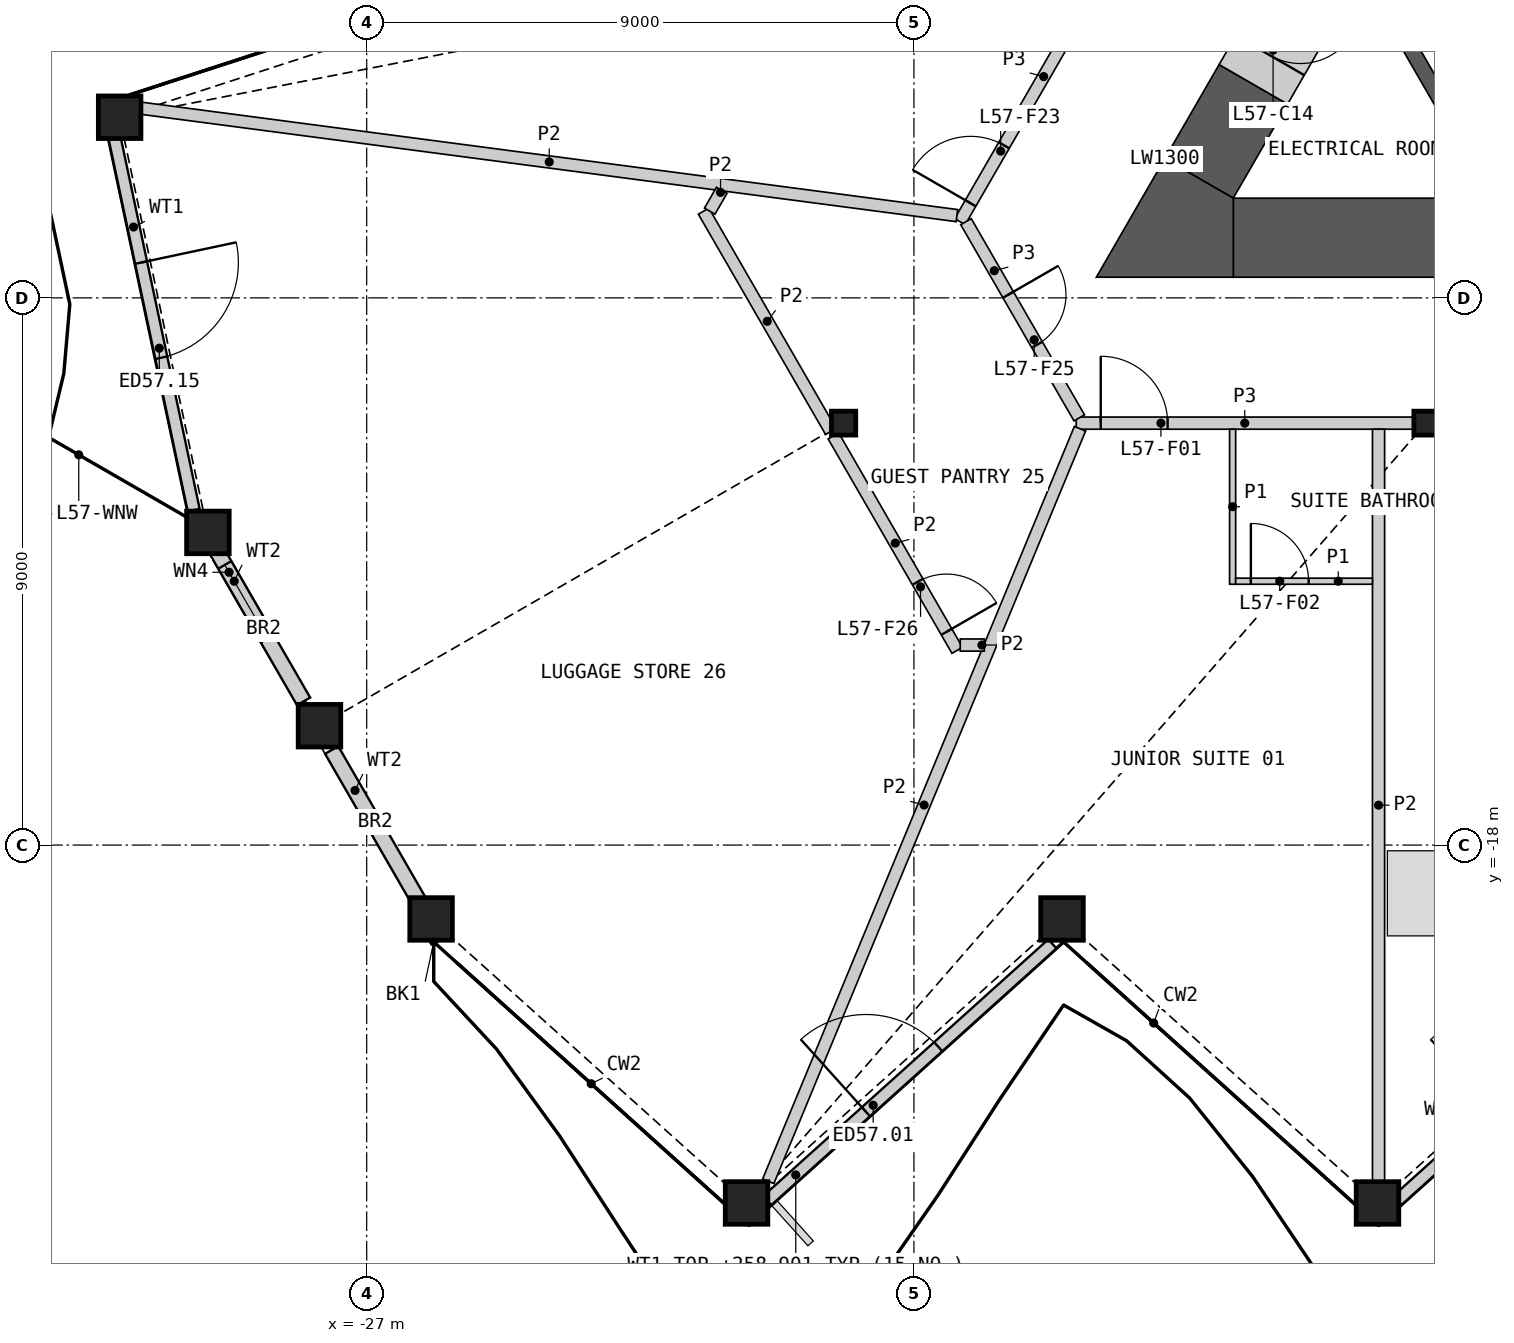
"""IFC4 building model, lengths in metres.
Left out: names, types, materials, properties, quantities, classifications, styles, units other than length and angle.
Written with IfcOpenShell. Run it as: python <this file> out.ifc"""

import sys

from ifc_helpers import new_model, si_unit, direction, frame, frame_2d, origin, origin_2d, place, context, subcontext, project, spatial, polyline, rectangle, hollow_rectangle, i_section, outline, extrude, element, fill, save


model = new_model("IFC4")
c1 = context("Model", 3, precision=1e-05, world=origin(), true_north=direction((0.0, 1.0)))
c2 = subcontext(c1, "Body", "Model", "MODEL_VIEW")
j1 = project(units=[si_unit("LENGTHUNIT", "METRE"), si_unit("PLANEANGLEUNIT", "RADIAN")], contexts=[c1])
p1 = place(None, origin())
s1 = spatial("IfcSite", under=j1, at=p1, CompositionType="ELEMENT")
p2 = place(p1, origin())
s2 = spatial("IfcBuilding", under=s1, at=p2, CompositionType="ELEMENT")
p3 = place(p2, frame((0.0, 0.0, 256.2)))
s3 = spatial("IfcBuildingStorey", under=s2, at=p3, CompositionType="ELEMENT", Elevation=256.2)
for number, where, z_axis, x_axis in (
    (1, (-25.941, -19.215, 0.0), (0.0, 0.0, 1.0), (1.0, 0.0, 0.0)),
    (2, (-20.753, -23.887, 0.0), (0.0, 0.0, 1.0), (1.0, 0.0, 0.0)),
    (3, (-15.565, -19.215, 0.0), (0.0, 0.0, 1.0), (1.0, 0.0, 0.0)),
    (4, (-10.376, -23.887, 0.0), (0.0, 0.0, 1.0), (1.0, 0.0, 0.0)),
    (5, (-31.063, -6.029, 0.0), (0.0, 0.0, 1.0), (1.0, 0.0, 0.0)),
    (6, (-29.612, -12.858, 0.0), (0.0, 0.0, 1.0), (1.0, 0.0, 0.0)),
    (7, (-27.776, -16.037, 0.0), (0.0, 0.0, 1.0), (1.0, 0.0, 0.0)),
):
    element("IfcColumn", number, at=place(p3, frame(where, z_axis=z_axis, x_axis=x_axis)), inside=s3, PredefinedType="COLUMN", context=c2, shape_type="SweptSolid", body=[
        extrude(hollow_rectangle(XDim=0.7, YDim=0.7, WallThickness=0.045, at=origin_2d()), origin(), (0.0, 0.0, 1.0), 3.6),
    ])
for number, where, z_axis, x_axis in (
    (8, (-19.157, -11.06, 0.0), (0.0, 0.0, 1.0), (1.0, 0.0, 0.0)),
    (9, (-9.578, -11.06, 0.0), (0.0, 0.0, 1.0), (1.0, 0.0, 0.0)),
):
    element("IfcColumn", number, at=place(p3, frame(where, z_axis=z_axis, x_axis=x_axis)), inside=s3, PredefinedType="COLUMN", context=c2, shape_type="SweptSolid", body=[
        extrude(i_section(OverallWidth=0.399, OverallDepth=0.393, WebThickness=0.023, FlangeThickness=0.037, at=origin_2d()), origin(), (0.0, 0.0, 1.0), 3.6),
    ])
p4 = place(p3, frame((-20.413, -23.848, 0.0), z_axis=(0.0, 0.0, 1.0), x_axis=(0.74314024121, 0.669135697668, 0.0)))
e10 = element("IfcWall", 10, at=p4, inside=s3, PredefinedType="SOLIDWALL", context=c2, shape_type="SweptSolid", body=[
    extrude(rectangle(XDim=6.311, YDim=0.2, at=frame_2d((3.156, 0.0))), origin(), (0.0, 0.0, 1.0), 2.701),
])
p5 = place(p4, frame((2.184, 0.0, 0.0)))
e11 = element("IfcOpeningElement", 11, at=p5, cuts=e10, PredefinedType="OPENING", context=c2, shape_type="SweptSolid", body=[
    extrude(rectangle(XDim=1.6, YDim=2.4, at=frame_2d((0.8, 1.2))), frame((0.0, 0.11, 0.0), z_axis=(0.0, -1.0, 0.0), x_axis=(1.0, 0.0, 0.0)), (0.0, 0.0, 1.0), 0.22),
])
p6 = place(p3, frame((-10.054, -23.848, 0.0), z_axis=(0.0, 0.0, 1.0), x_axis=(0.74314024121, 0.669135697668, 0.0)))
e12 = element("IfcWall", 12, at=p6, inside=s3, PredefinedType="SOLIDWALL", context=c2, shape_type="SweptSolid", body=[
    extrude(rectangle(XDim=6.311, YDim=0.2, at=frame_2d((3.156, 0.0))), origin(), (0.0, 0.0, 1.0), 2.701),
])
p7 = place(p6, frame((2.184, 0.0, 0.0)))
e13 = element("IfcOpeningElement", 13, at=p7, cuts=e12, PredefinedType="OPENING", context=c2, shape_type="SweptSolid", body=[
    extrude(rectangle(XDim=1.6, YDim=2.4, at=frame_2d((0.8, 1.2))), frame((0.0, 0.11, 0.0), z_axis=(0.0, -1.0, 0.0), x_axis=(1.0, 0.0, 0.0)), (0.0, 0.0, 1.0), 0.22),
])
p8 = place(p3, frame((-31.164, -6.283, 0.0), z_axis=(0.0, 0.0, 1.0), x_axis=(0.207900158502, -0.978150051932, 0.0)))
e14 = element("IfcWall", 14, at=p8, inside=s3, PredefinedType="SOLIDWALL", context=c2, shape_type="SweptSolid", body=[
    extrude(rectangle(XDim=6.347, YDim=0.2, at=frame_2d((3.174, 0.0))), origin(), (0.0, 0.0, 1.0), 2.701),
])
p9 = place(p8, frame((2.184, 0.0, 0.0)))
e15 = element("IfcOpeningElement", 15, at=p9, cuts=e14, PredefinedType="OPENING", context=c2, shape_type="SweptSolid", body=[
    extrude(rectangle(XDim=1.6, YDim=2.4, at=frame_2d((0.8, 1.2))), frame((0.0, 0.11, 0.0), z_axis=(0.0, -1.0, 0.0), x_axis=(1.0, 0.0, 0.0)), (0.0, 0.0, 1.0), 0.22),
])
p10 = place(p3, frame((-29.559, -13.002, 0.0), z_axis=(0.0, 0.0, 1.0), x_axis=(0.500023511883, -0.866011828767, 0.0)))
e16 = element("IfcWall", 16, at=p10, inside=s3, PredefinedType="SOLIDWALL", context=c2, shape_type="SweptSolid", body=[
    extrude(rectangle(XDim=3.042, YDim=0.25, at=frame_2d((1.521, 0.0))), origin(), (0.0, 0.0, 1.0), 2.701),
])
p11 = place(p10, frame((0.45, 0.0, 1.8)))
e17 = element("IfcOpeningElement", 17, at=p11, cuts=e16, PredefinedType="OPENING", context=c2, shape_type="SweptSolid", body=[
    extrude(rectangle(XDim=1.4, YDim=0.7, at=frame_2d((0.7, 0.35))), frame((0.0, 0.135, 0.0), z_axis=(0.0, -1.0, 0.0), x_axis=(1.0, 0.0, 0.0)), (0.0, 0.0, 1.0), 0.27),
])
p12 = place(p3, frame((-27.576, -16.437, 0.0), z_axis=(0.0, 0.0, 1.0), x_axis=(0.499976998774, -0.866038683141, 0.0)))
e18 = element("IfcWall", 18, at=p12, inside=s3, PredefinedType="SOLIDWALL", context=c2, shape_type="SweptSolid", body=[
    extrude(rectangle(XDim=3.072, YDim=0.25, at=frame_2d((1.536, 0.0))), origin(), (0.0, 0.0, 1.0), 2.701),
])
p13 = place(p3, origin())
e19 = element("IfcWall", 19, at=p13, inside=s3, PredefinedType="SHEAR", context=c2, shape_type="SweptSolid", body=[
    extrude(outline(polyline([(-10.374, -4.206), (-8.83, -6.881), (-8.738, -6.539), (-10.032, -4.298), (-10.374, -4.206)])), origin(), (0.0, 0.0, 1.0), 3.25),
])
p14 = place(p3, frame((-12.748, -8.01, 0.0), z_axis=(0.0, 0.0, 1.0), x_axis=(1.0, 0.0, 0.0)))
e20 = element("IfcWall", 20, at=p14, inside=s3, PredefinedType="SHEAR", context=c2, shape_type="SweptSolid", body=[
    extrude(rectangle(XDim=25.497, YDim=1.3, at=frame_2d((12.748, 0.0))), origin(), (0.0, 0.0, 1.0), 3.25),
])
p15 = place(p3, frame((-12.418, -5.488, 0.0), z_axis=(0.0, 0.0, 1.0), x_axis=(-0.499931460552, -0.866064971437, 0.0)))
e21 = element("IfcWall", 21, at=p15, inside=s3, PredefinedType="SHEAR", context=c2, shape_type="SweptSolid", body=[
    extrude(rectangle(XDim=1.786, YDim=1.3, at=frame_2d((0.893, 0.0))), origin(), (0.0, 0.0, 1.0), 3.25),
])
p16 = place(p3, origin())
e22 = element("IfcWall", 22, at=p16, inside=s3, PredefinedType="SHEAR", context=c2, shape_type="SweptSolid", body=[
    extrude(outline(polyline([(-13.874, -6.71), (-12.748, -7.36), (-12.748, -8.66), (-15.0, -8.66), (-13.874, -6.71)])), origin(), (0.0, 0.0, 1.0), 3.25),
])
p17 = place(p3, frame((-11.318, -3.583, 0.0), z_axis=(0.0, 0.0, 1.0), x_axis=(-0.50002983664, -0.866008176907, 0.0)))
e23 = element("IfcWall", 23, at=p17, inside=s3, PredefinedType="SHEAR", context=c2, shape_type="SweptSolid", body=[
    extrude(rectangle(XDim=2.2, YDim=1.3, at=frame_2d((1.1, 0.0))), origin(), (0.0, 0.0, 1.0), 3.25),
])
p18 = place(p17, frame((0.65, 0.0, 0.0)))
e24 = element("IfcOpeningElement", 24, at=p18, cuts=e23, PredefinedType="OPENING", context=c2, shape_type="SweptSolid", body=[
    extrude(rectangle(XDim=1.0, YDim=2.1, at=frame_2d((0.5, 1.05))), frame((0.0, 0.66, 0.0), z_axis=(0.0, -1.0, 0.0), x_axis=(1.0, 0.0, 0.0)), (0.0, 0.0, 1.0), 1.32),
])
p19 = place(p3, frame((-15.331, -11.06, 0.0), z_axis=(0.0, 0.0, 1.0), x_axis=(1.0, 0.0, 0.0)))
e25 = element("IfcWall", 25, at=p19, inside=s3, PredefinedType="PARTITIONING", context=c2, shape_type="SweptSolid", body=[
    extrude(rectangle(XDim=5.543, YDim=0.2, at=frame_2d((2.771, 0.0))), origin(), (0.0, 0.0, 1.0), 3.25),
])
p20 = place(p19, frame((0.403, 0.0, 0.0)))
e26 = element("IfcOpeningElement", 26, at=p20, cuts=e25, PredefinedType="OPENING", context=c2, shape_type="SweptSolid", body=[
    extrude(rectangle(XDim=1.1, YDim=2.1, at=frame_2d((0.55, 1.05))), frame((0.0, 0.11, 0.0), z_axis=(0.0, -1.0, 0.0), x_axis=(1.0, 0.0, 0.0)), (0.0, 0.0, 1.0), 0.22),
])
p21 = place(p3, frame((-17.244, -7.747, 0.0), z_axis=(0.0, 0.0, 1.0), x_axis=(0.500017753321, 0.866015153657, 0.0)))
e27 = element("IfcWall", 27, at=p21, inside=s3, PredefinedType="PARTITIONING", context=c2, shape_type="SweptSolid", body=[
    extrude(rectangle(XDim=5.51, YDim=0.2, at=frame_2d((2.755, 0.0))), origin(), (0.0, 0.0, 1.0), 3.25),
])
p22 = place(p21, frame((0.35, 0.0, 0.0)))
e28 = element("IfcOpeningElement", 28, at=p22, cuts=e27, PredefinedType="OPENING", context=c2, shape_type="SweptSolid", body=[
    extrude(rectangle(XDim=1.1, YDim=2.1, at=frame_2d((0.55, 1.05))), frame((0.0, 0.11, 0.0), z_axis=(0.0, -1.0, 0.0), x_axis=(1.0, 0.0, 0.0)), (0.0, 0.0, 1.0), 0.22),
])
p23 = place(p3, frame((-17.144, -7.747, 0.0), z_axis=(0.0, 0.0, 1.0), x_axis=(0.499958791762, -0.866049194065, 0.0)))
e29 = element("IfcWall", 29, at=p23, inside=s3, PredefinedType="PARTITIONING", context=c2, shape_type="SweptSolid", body=[
    extrude(rectangle(XDim=3.726, YDim=0.2, at=frame_2d((1.863, 0.0))), origin(), (0.0, 0.0, 1.0), 3.25),
])
p24 = place(p23, frame((1.388, 0.0, 0.0)))
e30 = element("IfcOpeningElement", 30, at=p24, cuts=e29, PredefinedType="OPENING", context=c2, shape_type="SweptSolid", body=[
    extrude(rectangle(XDim=0.95, YDim=2.1, at=frame_2d((0.475, 1.05))), frame((0.0, 0.11, 0.0), z_axis=(0.0, -1.0, 0.0), x_axis=(1.0, 0.0, 0.0)), (0.0, 0.0, 1.0), 0.22),
])
p25 = place(p3, frame((-30.703, -5.882, 0.0), z_axis=(0.0, 0.0, 1.0), x_axis=(0.991445815272, -0.130518946443, 0.0)))
e31 = element("IfcWall", 31, at=p25, inside=s3, PredefinedType="PARTITIONING", context=c2, shape_type="SweptSolid", body=[
    extrude(rectangle(XDim=13.526, YDim=0.2, at=frame_2d((6.763, 0.0))), origin(), (0.0, 0.0, 1.0), 2.404),
])
p26 = place(p3, frame((-20.396, -23.53, 0.0), z_axis=(0.0, 0.0, 1.0), x_axis=(0.382692998932, 0.923875569851, 0.0)))
e32 = element("IfcWall", 32, at=p26, inside=s3, PredefinedType="PARTITIONING", context=c2, shape_type="SweptSolid", body=[
    extrude(rectangle(XDim=13.397, YDim=0.2, at=frame_2d((6.698, 0.0))), origin(), (0.0, 0.0, 1.0), 2.404),
])
p27 = place(p3, frame((-10.359, -23.527, 0.0), z_axis=(0.0, 0.0, 1.0), x_axis=(0.0, 1.0, 0.0)))
e33 = element("IfcWall", 33, at=p27, inside=s3, PredefinedType="PARTITIONING", context=c2, shape_type="SweptSolid", body=[
    extrude(rectangle(XDim=12.366, YDim=0.2, at=frame_2d((6.183, 0.0))), origin(), (0.0, 0.0, 1.0), 2.404),
])
p28 = place(p3, frame((-21.458, -7.574, 0.0), z_axis=(0.0, 0.0, 1.0), x_axis=(0.499973304129, -0.866040816104, 0.0)))
e34 = element("IfcWall", 34, at=p28, inside=s3, PredefinedType="PARTITIONING", context=c2, shape_type="SweptSolid", body=[
    extrude(rectangle(XDim=4.184, YDim=0.2, at=frame_2d((2.092, 0.0))), origin(), (0.0, 0.0, 1.0), 2.404),
])
p29 = place(p3, frame((-19.325, -11.27, 0.0), z_axis=(0.0, 0.0, 1.0), x_axis=(0.500000928893, -0.866024867487, 0.0)))
e35 = element("IfcWall", 35, at=p29, inside=s3, PredefinedType="PARTITIONING", context=c2, shape_type="SweptSolid", body=[
    extrude(rectangle(XDim=4.073, YDim=0.2, at=frame_2d((2.036, 0.0))), origin(), (0.0, 0.0, 1.0), 2.404),
])
p30 = place(p29, frame((2.772, 0.0, 0.0)))
e36 = element("IfcOpeningElement", 36, at=p30, cuts=e35, PredefinedType="OPENING", context=c2, shape_type="SweptSolid", body=[
    extrude(rectangle(XDim=0.95, YDim=2.1, at=frame_2d((0.475, 1.05))), frame((0.0, 0.11, 0.0), z_axis=(0.0, -1.0, 0.0), x_axis=(1.0, 0.0, 0.0)), (0.0, 0.0, 1.0), 0.22),
])
for number, where, z_axis, x_axis in (
    (37, (-17.238, -14.71, 0.0), (0.0, 0.0, 1.0), (1.0, 0.0, 0.0)),
    (38, (-21.359, -7.574, 0.0), (0.0, 0.0, 1.0), (0.5, 0.866, 0.0)),
):
    element("IfcWall", number, at=place(p3, frame(where, z_axis=z_axis, x_axis=x_axis)), inside=s3, PredefinedType="PARTITIONING", context=c2, shape_type="SweptSolid", body=[
        extrude(rectangle(XDim=0.396, YDim=0.2, at=frame_2d((0.198, 0.0))), origin(), (0.0, 0.0, 1.0), 2.404),
    ])
p31 = place(p3, frame((-12.759, -13.71, 0.0), z_axis=(0.0, 0.0, 1.0), x_axis=(0.0, 1.0, 0.0)))
e39 = element("IfcWall", 39, at=p31, inside=s3, PredefinedType="PARTITIONING", context=c2, shape_type="SweptSolid", body=[
    extrude(rectangle(XDim=2.55, YDim=0.1, at=frame_2d((1.275, 0.0))), origin(), (0.0, 0.0, 1.0), 2.404),
])
p32 = place(p3, frame((-12.709, -13.66, 0.0), z_axis=(0.0, 0.0, 1.0), x_axis=(1.0, 0.0, 0.0)))
e40 = element("IfcWall", 40, at=p32, inside=s3, PredefinedType="PARTITIONING", context=c2, shape_type="SweptSolid", body=[
    extrude(rectangle(XDim=2.25, YDim=0.1, at=frame_2d((1.125, 0.0))), origin(), (0.0, 0.0, 1.0), 2.404),
])
p33 = place(p32, frame((0.25, 0.0, 0.0)))
e41 = element("IfcOpeningElement", 41, at=p33, cuts=e40, PredefinedType="OPENING", context=c2, shape_type="SweptSolid", body=[
    extrude(rectangle(XDim=0.95, YDim=2.1, at=frame_2d((0.475, 1.05))), frame((0.0, 0.06, 0.0), z_axis=(0.0, -1.0, 0.0), x_axis=(1.0, 0.0, 0.0)), (0.0, 0.0, 1.0), 0.12),
])
p34 = place(p5, origin())
e42 = element("IfcDoor", 42, at=p34, inside=s3, OperationType="DOUBLE_DOOR_SINGLE_SWING", PredefinedType="DOOR", context=c2, shape_type="SweptSolid", body=[
    extrude(rectangle(XDim=1.6, YDim=2.4, at=frame_2d((0.8, 1.2))), frame((0.0, 0.025, 0.0), z_axis=(0.0, -1.0, 0.0), x_axis=(1.0, 0.0, 0.0)), (0.0, 0.0, 1.0), 0.05),
])
fill(e11, e42)
p35 = place(p9, origin())
e43 = element("IfcDoor", 43, at=p35, inside=s3, OperationType="DOUBLE_DOOR_SINGLE_SWING", PredefinedType="DOOR", context=c2, shape_type="SweptSolid", body=[
    extrude(rectangle(XDim=1.6, YDim=2.4, at=frame_2d((0.8, 1.2))), frame((0.0, 0.025, 0.0), z_axis=(0.0, -1.0, 0.0), x_axis=(1.0, 0.0, 0.0)), (0.0, 0.0, 1.0), 0.05),
])
fill(e15, e43)
p36 = place(p11, origin())
e44 = element("IfcWindow", 44, at=p36, inside=s3, PartitioningType="SINGLE_PANEL", PredefinedType="WINDOW", context=c2, shape_type="SweptSolid", body=[
    extrude(rectangle(XDim=1.4, YDim=0.7, at=frame_2d((0.7, 0.35))), frame((0.0, 0.03, 0.0), z_axis=(0.0, -1.0, 0.0), x_axis=(1.0, 0.0, 0.0)), (0.0, 0.0, 1.0), 0.06),
])
fill(e17, e44)
p37 = place(p18, origin())
e45 = element("IfcDoor", 45, at=p37, inside=s3, OperationType="SINGLE_SWING_LEFT", PredefinedType="DOOR", context=c2, shape_type="SweptSolid", body=[
    extrude(rectangle(XDim=1.0, YDim=2.1, at=frame_2d((0.5, 1.05))), frame((0.0, 0.405, 0.0), z_axis=(0.0, -1.0, 0.0), x_axis=(1.0, 0.0, 0.0)), (0.0, 0.0, 1.0), 0.05),
])
fill(e24, e45)
p38 = place(p20, origin())
e46 = element("IfcDoor", 46, at=p38, inside=s3, OperationType="SINGLE_SWING_LEFT", PredefinedType="DOOR", context=c2, shape_type="SweptSolid", body=[
    extrude(rectangle(XDim=1.1, YDim=2.1, at=frame_2d((0.55, 1.05))), frame((0.0, 0.025, 0.0), z_axis=(0.0, -1.0, 0.0), x_axis=(1.0, 0.0, 0.0)), (0.0, 0.0, 1.0), 0.05),
])
fill(e26, e46)
p39 = place(p33, origin())
e47 = element("IfcDoor", 47, at=p39, inside=s3, OperationType="SINGLE_SWING_LEFT", PredefinedType="DOOR", context=c2, shape_type="SweptSolid", body=[
    extrude(rectangle(XDim=0.95, YDim=2.1, at=frame_2d((0.475, 1.05))), frame((0.0, 0.025, 0.0), z_axis=(0.0, -1.0, 0.0), x_axis=(1.0, 0.0, 0.0)), (0.0, 0.0, 1.0), 0.05),
])
fill(e41, e47)
p40 = place(p22, origin())
e48 = element("IfcDoor", 48, at=p40, inside=s3, OperationType="SINGLE_SWING_LEFT", PredefinedType="DOOR", context=c2, shape_type="SweptSolid", body=[
    extrude(rectangle(XDim=1.1, YDim=2.1, at=frame_2d((0.55, 1.05))), frame((0.0, 0.025, 0.0), z_axis=(0.0, -1.0, 0.0), x_axis=(1.0, 0.0, 0.0)), (0.0, 0.0, 1.0), 0.05),
])
fill(e28, e48)
p41 = place(p24, origin())
e49 = element("IfcDoor", 49, at=p41, inside=s3, OperationType="SINGLE_SWING_LEFT", PredefinedType="DOOR", context=c2, shape_type="SweptSolid", body=[
    extrude(rectangle(XDim=0.95, YDim=2.1, at=frame_2d((0.475, 1.05))), frame((0.0, 0.025, 0.0), z_axis=(0.0, -1.0, 0.0), x_axis=(1.0, 0.0, 0.0)), (0.0, 0.0, 1.0), 0.05),
])
fill(e30, e49)
p42 = place(p30, origin())
e50 = element("IfcDoor", 50, at=p42, inside=s3, OperationType="SINGLE_SWING_RIGHT", PredefinedType="DOOR", context=c2, shape_type="SweptSolid", body=[
    extrude(rectangle(XDim=0.95, YDim=2.1, at=frame_2d((0.475, 1.05))), frame((0.0, 0.025, 0.0), z_axis=(0.0, -1.0, 0.0), x_axis=(1.0, 0.0, 0.0)), (0.0, 0.0, 1.0), 0.05),
])
fill(e36, e50)
save(model, sys.argv[1])
